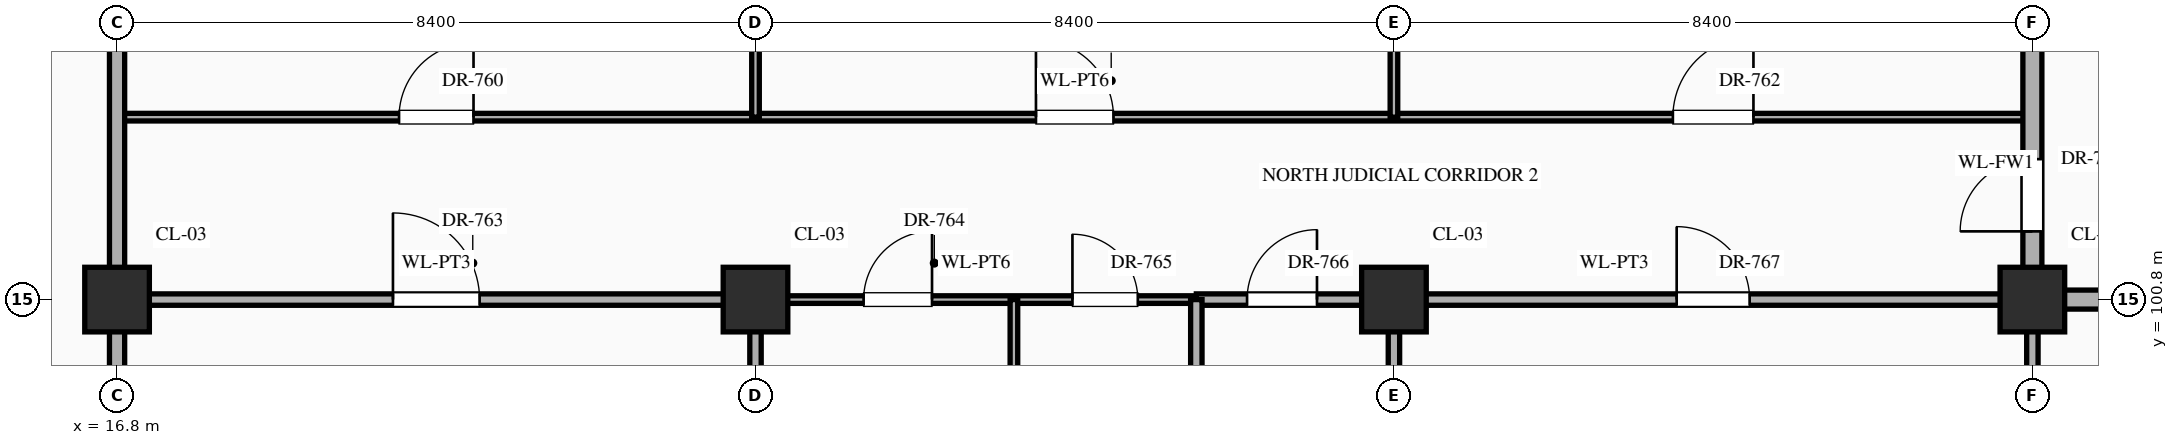
"""IFC4 building model, lengths in metres.
Left out: names, types, materials, properties, quantities, classifications, styles, units other than length and angle.
Written with IfcOpenShell. Run it as: python <this file> out.ifc"""

import sys

from ifc_helpers import new_model, si_unit, direction, frame, frame_2d, origin, origin_2d, place, context, subcontext, project, spatial, rectangle, extrude, element, fill, save


model = new_model("IFC4")
c1 = context("Model", 3, precision=1e-05, world=origin(), true_north=direction((0.0, 1.0)))
c2 = subcontext(c1, "Body", "Model", "MODEL_VIEW")
j1 = project(units=[si_unit("LENGTHUNIT", "METRE"), si_unit("PLANEANGLEUNIT", "RADIAN")], contexts=[c1])
p1 = place(None, origin())
s1 = spatial("IfcSite", under=j1, at=p1, CompositionType="ELEMENT")
p2 = place(p1, origin())
s2 = spatial("IfcBuilding", under=s1, at=p2, CompositionType="ELEMENT")
p3 = place(p2, origin())
s3 = spatial("IfcBuildingStorey", under=s2, at=p3, CompositionType="ELEMENT", Elevation=0.0)
for number, where, z_axis, x_axis in (
    (1, (16.8, 100.8, 0.0), (0.0, 0.0, 1.0), (1.0, 0.0, 0.0)),
    (2, (25.2, 100.8, 0.0), (0.0, 0.0, 1.0), (1.0, 0.0, 0.0)),
    (3, (33.6, 100.8, 0.0), (0.0, 0.0, 1.0), (1.0, 0.0, 0.0)),
    (4, (42.0, 100.8, 0.0), (0.0, 0.0, 1.0), (1.0, 0.0, 0.0)),
):
    element("IfcColumn", number, at=place(p3, frame(where, z_axis=z_axis, x_axis=x_axis)), inside=s3, PredefinedType="COLUMN", context=c2, shape_type="SweptSolid", body=[
        extrude(rectangle(XDim=0.85, YDim=0.85, at=origin_2d()), origin(), (0.0, 0.0, 1.0), 5.4),
    ])
p4 = place(p3, frame((16.8, 100.8, 0.0), z_axis=(0.0, 0.0, 1.0), x_axis=(1.0, 0.0, 0.0)))
e5 = element("IfcWall", 5, at=p4, inside=s3, PredefinedType="STANDARD", context=c2, shape_type="SweptSolid", body=[
    extrude(rectangle(XDim=8.4, YDim=0.15, at=frame_2d((4.2, 0.0))), origin(), (0.0, 0.0, 1.0), 4.27),
])
p5 = place(p4, frame((3.63, 0.0, 0.0)))
e6 = element("IfcOpeningElement", 6, at=p5, cuts=e5, PredefinedType="OPENING", context=c2, shape_type="SweptSolid", body=[
    extrude(rectangle(XDim=1.14, YDim=2.4, at=frame_2d((0.57, 1.2))), frame((0.0, 0.087, 0.0), z_axis=(0.0, -1.0, 0.0), x_axis=(1.0, 0.0, 0.0)), (0.0, 0.0, 1.0), 0.174),
])
p6 = place(p3, frame((25.2, 100.8, 0.0), z_axis=(0.0, 0.0, 1.0), x_axis=(1.0, 0.0, 0.0)))
e7 = element("IfcWall", 7, at=p6, inside=s3, PredefinedType="STANDARD", context=c2, shape_type="SweptSolid", body=[
    extrude(rectangle(XDim=5.8, YDim=0.1, at=frame_2d((2.9, 0.0))), origin(), (0.0, 0.0, 1.0), 4.27),
])
p7 = place(p6, frame((1.423, 0.0, 0.0)))
e8 = element("IfcOpeningElement", 8, at=p7, cuts=e7, PredefinedType="OPENING", context=c2, shape_type="SweptSolid", body=[
    extrude(rectangle(XDim=0.9, YDim=2.15, at=frame_2d((0.45, 1.075))), frame((0.0, 0.062, 0.0), z_axis=(0.0, -1.0, 0.0), x_axis=(1.0, 0.0, 0.0)), (0.0, 0.0, 1.0), 0.124),
])
p8 = place(p6, frame((4.17, 0.0, 0.0)))
e9 = element("IfcOpeningElement", 9, at=p8, cuts=e7, PredefinedType="OPENING", context=c2, shape_type="SweptSolid", body=[
    extrude(rectangle(XDim=0.86, YDim=2.1, at=frame_2d((0.43, 1.05))), frame((0.0, 0.062, 0.0), z_axis=(0.0, -1.0, 0.0), x_axis=(1.0, 0.0, 0.0)), (0.0, 0.0, 1.0), 0.124),
])
p9 = place(p3, frame((31.0, 100.8, 0.0), z_axis=(0.0, 0.0, 1.0), x_axis=(1.0, 0.0, 0.0)))
e10 = element("IfcWall", 10, at=p9, inside=s3, PredefinedType="STANDARD", context=c2, shape_type="SweptSolid", body=[
    extrude(rectangle(XDim=11.0, YDim=0.15, at=frame_2d((5.5, 0.0))), origin(), (0.0, 0.0, 1.0), 4.27),
])
p10 = place(p9, frame((0.667, 0.0, 0.0)))
e11 = element("IfcOpeningElement", 11, at=p10, cuts=e10, PredefinedType="OPENING", context=c2, shape_type="SweptSolid", body=[
    extrude(rectangle(XDim=0.92, YDim=2.15, at=frame_2d((0.46, 1.075))), frame((0.0, 0.087, 0.0), z_axis=(0.0, -1.0, 0.0), x_axis=(1.0, 0.0, 0.0)), (0.0, 0.0, 1.0), 0.174),
])
p11 = place(p9, frame((6.32, 0.0, 0.0)))
e12 = element("IfcOpeningElement", 12, at=p11, cuts=e10, PredefinedType="OPENING", context=c2, shape_type="SweptSolid", body=[
    extrude(rectangle(XDim=0.96, YDim=2.2, at=frame_2d((0.48, 1.1))), frame((0.0, 0.087, 0.0), z_axis=(0.0, -1.0, 0.0), x_axis=(1.0, 0.0, 0.0)), (0.0, 0.0, 1.0), 0.174),
])
p12 = place(p3, frame((42.0, 100.8, 0.0), z_axis=(0.0, 0.0, 1.0), x_axis=(1.0, 0.0, 0.0)))
e13 = element("IfcWall", 13, at=p12, inside=s3, PredefinedType="STANDARD", context=c2, shape_type="SweptSolid", body=[
    extrude(rectangle(XDim=4.2, YDim=0.25, at=frame_2d((2.1, 0.0))), origin(), (0.0, 0.0, 1.0), 4.27),
])
p13 = place(p3, frame((16.8, 103.2, 0.0), z_axis=(0.0, 0.0, 1.0), x_axis=(1.0, 0.0, 0.0)))
e14 = element("IfcWall", 14, at=p13, inside=s3, PredefinedType="STANDARD", context=c2, shape_type="SweptSolid", body=[
    extrude(rectangle(XDim=25.2, YDim=0.1, at=frame_2d((12.6, 0.0))), origin(), (0.0, 0.0, 1.0), 5.12),
])
p14 = place(p13, frame((3.71, 0.0, 0.0)))
e15 = element("IfcOpeningElement", 15, at=p14, cuts=e14, PredefinedType="OPENING", context=c2, shape_type="SweptSolid", body=[
    extrude(rectangle(XDim=0.98, YDim=2.35, at=frame_2d((0.49, 1.175))), frame((0.0, 0.062, 0.0), z_axis=(0.0, -1.0, 0.0), x_axis=(1.0, 0.0, 0.0)), (0.0, 0.0, 1.0), 0.124),
])
p15 = place(p13, frame((12.09, 0.0, 0.0)))
e16 = element("IfcOpeningElement", 16, at=p15, cuts=e14, PredefinedType="OPENING", context=c2, shape_type="SweptSolid", body=[
    extrude(rectangle(XDim=1.02, YDim=2.4, at=frame_2d((0.51, 1.2))), frame((0.0, 0.062, 0.0), z_axis=(0.0, -1.0, 0.0), x_axis=(1.0, 0.0, 0.0)), (0.0, 0.0, 1.0), 0.124),
])
p16 = place(p13, frame((20.47, 0.0, 0.0)))
e17 = element("IfcOpeningElement", 17, at=p16, cuts=e14, PredefinedType="OPENING", context=c2, shape_type="SweptSolid", body=[
    extrude(rectangle(XDim=1.06, YDim=2.4, at=frame_2d((0.53, 1.2))), frame((0.0, 0.062, 0.0), z_axis=(0.0, -1.0, 0.0), x_axis=(1.0, 0.0, 0.0)), (0.0, 0.0, 1.0), 0.124),
])
p17 = place(p3, frame((16.8, 91.2, 0.0), z_axis=(0.0, 0.0, 1.0), x_axis=(0.0, 1.0, 0.0)))
e18 = element("IfcWall", 18, at=p17, inside=s3, PredefinedType="STANDARD", context=c2, shape_type="SweptSolid", body=[
    extrude(rectangle(XDim=16.76, YDim=0.2, at=frame_2d((8.38, 0.0))), origin(), (0.0, 0.0, 1.0), 4.37),
])
p18 = place(p3, frame((25.2, 96.0, 0.0), z_axis=(0.0, 0.0, 1.0), x_axis=(0.0, 1.0, 0.0)))
e19 = element("IfcWall", 19, at=p18, inside=s3, PredefinedType="STANDARD", context=c2, shape_type="SweptSolid", body=[
    extrude(rectangle(XDim=4.8, YDim=0.15, at=frame_2d((2.4, 0.0))), origin(), (0.0, 0.0, 1.0), 4.37),
])
p19 = place(p3, frame((25.2, 103.2, 0.0), z_axis=(0.0, 0.0, 1.0), x_axis=(0.0, 1.0, 0.0)))
e20 = element("IfcWall", 20, at=p19, inside=s3, PredefinedType="STANDARD", context=c2, shape_type="SweptSolid", body=[
    extrude(rectangle(XDim=4.76, YDim=0.1, at=frame_2d((2.38, 0.0))), origin(), (0.0, 0.0, 1.0), 4.37),
])
p20 = place(p3, frame((28.6, 96.0, 0.0), z_axis=(0.0, 0.0, 1.0), x_axis=(0.0, 1.0, 0.0)))
e21 = element("IfcWall", 21, at=p20, inside=s3, PredefinedType="STANDARD", context=c2, shape_type="SweptSolid", body=[
    extrude(rectangle(XDim=4.8, YDim=0.1, at=frame_2d((2.4, 0.0))), origin(), (0.0, 0.0, 1.0), 5.12),
])
p21 = place(p20, frame((1.91, 0.0, 0.0)))
e22 = element("IfcOpeningElement", 22, at=p21, cuts=e21, PredefinedType="OPENING", context=c2, shape_type="SweptSolid", body=[
    extrude(rectangle(XDim=0.98, YDim=2.35, at=frame_2d((0.49, 1.175))), frame((0.0, 0.062, 0.0), z_axis=(0.0, -1.0, 0.0), x_axis=(1.0, 0.0, 0.0)), (0.0, 0.0, 1.0), 0.124),
])
p22 = place(p3, frame((31.0, 96.0, 0.0), z_axis=(0.0, 0.0, 1.0), x_axis=(0.0, 1.0, 0.0)))
e23 = element("IfcWall", 23, at=p22, inside=s3, PredefinedType="STANDARD", context=c2, shape_type="SweptSolid", body=[
    extrude(rectangle(XDim=4.8, YDim=0.15, at=frame_2d((2.4, 0.0))), origin(), (0.0, 0.0, 1.0), 5.12),
])
p23 = place(p22, frame((1.89, 0.0, 0.0)))
e24 = element("IfcOpeningElement", 24, at=p23, cuts=e23, PredefinedType="OPENING", context=c2, shape_type="SweptSolid", body=[
    extrude(rectangle(XDim=1.02, YDim=2.4, at=frame_2d((0.51, 1.2))), frame((0.0, 0.087, 0.0), z_axis=(0.0, -1.0, 0.0), x_axis=(1.0, 0.0, 0.0)), (0.0, 0.0, 1.0), 0.174),
])
p24 = place(p3, frame((33.6, 96.0, 0.0), z_axis=(0.0, 0.0, 1.0), x_axis=(0.0, 1.0, 0.0)))
e25 = element("IfcWall", 25, at=p24, inside=s3, PredefinedType="STANDARD", context=c2, shape_type="SweptSolid", body=[
    extrude(rectangle(XDim=4.8, YDim=0.15, at=frame_2d((2.4, 0.0))), origin(), (0.0, 0.0, 1.0), 4.37),
])
p25 = place(p3, frame((33.6, 103.2, 0.0), z_axis=(0.0, 0.0, 1.0), x_axis=(0.0, 1.0, 0.0)))
e26 = element("IfcWall", 26, at=p25, inside=s3, PredefinedType="STANDARD", context=c2, shape_type="SweptSolid", body=[
    extrude(rectangle(XDim=4.76, YDim=0.1, at=frame_2d((2.38, 0.0))), origin(), (0.0, 0.0, 1.0), 4.37),
])
p26 = place(p3, frame((42.0, 96.0, 0.0), z_axis=(0.0, 0.0, 1.0), x_axis=(0.0, 1.0, 0.0)))
e27 = element("IfcWall", 27, at=p26, inside=s3, PredefinedType="STANDARD", context=c2, shape_type="SweptSolid", body=[
    extrude(rectangle(XDim=4.8, YDim=0.15, at=frame_2d((2.4, 0.0))), origin(), (0.0, 0.0, 1.0), 4.37),
])
p27 = place(p3, frame((42.0, 100.8, 0.0), z_axis=(0.0, 0.0, 1.0), x_axis=(0.0, 1.0, 0.0)))
e28 = element("IfcWall", 28, at=p27, inside=s3, PredefinedType="STANDARD", context=c2, shape_type="SweptSolid", body=[
    extrude(rectangle(XDim=3.6, YDim=0.25, at=frame_2d((1.8, 0.0))), origin(), (0.0, 0.0, 1.0), 4.37),
])
p28 = place(p27, frame((0.897, 0.0, 0.0)))
e29 = element("IfcOpeningElement", 29, at=p28, cuts=e28, PredefinedType="OPENING", context=c2, shape_type="SweptSolid", body=[
    extrude(rectangle(XDim=0.95, YDim=2.15, at=frame_2d((0.475, 1.075))), frame((0.0, 0.137, 0.0), z_axis=(0.0, -1.0, 0.0), x_axis=(1.0, 0.0, 0.0)), (0.0, 0.0, 1.0), 0.274),
])
p29 = place(p28, origin())
e30 = element("IfcDoor", 30, at=p29, inside=s3, OperationType="SINGLE_SWING_LEFT", PredefinedType="DOOR", context=c2, shape_type="SweptSolid", body=[
    extrude(rectangle(XDim=0.95, YDim=2.15, at=frame_2d((0.475, 1.075))), frame((0.0, 0.025, 0.0), z_axis=(0.0, -1.0, 0.0), x_axis=(1.0, 0.0, 0.0)), (0.0, 0.0, 1.0), 0.05),
])
fill(e29, e30)
p30 = place(p14, origin())
e31 = element("IfcDoor", 31, at=p30, inside=s3, OperationType="SINGLE_SWING_RIGHT", PredefinedType="DOOR", context=c2, shape_type="SweptSolid", body=[
    extrude(rectangle(XDim=0.98, YDim=2.35, at=frame_2d((0.49, 1.175))), frame((0.0, 0.025, 0.0), z_axis=(0.0, -1.0, 0.0), x_axis=(1.0, 0.0, 0.0)), (0.0, 0.0, 1.0), 0.05),
])
fill(e15, e31)
p31 = place(p15, origin())
e32 = element("IfcDoor", 32, at=p31, inside=s3, OperationType="SINGLE_SWING_LEFT", PredefinedType="DOOR", context=c2, shape_type="SweptSolid", body=[
    extrude(rectangle(XDim=1.02, YDim=2.4, at=frame_2d((0.51, 1.2))), frame((0.0, 0.025, 0.0), z_axis=(0.0, -1.0, 0.0), x_axis=(1.0, 0.0, 0.0)), (0.0, 0.0, 1.0), 0.05),
])
fill(e16, e32)
p32 = place(p16, origin())
e33 = element("IfcDoor", 33, at=p32, inside=s3, OperationType="SINGLE_SWING_RIGHT", PredefinedType="DOOR", context=c2, shape_type="SweptSolid", body=[
    extrude(rectangle(XDim=1.06, YDim=2.4, at=frame_2d((0.53, 1.2))), frame((0.0, 0.025, 0.0), z_axis=(0.0, -1.0, 0.0), x_axis=(1.0, 0.0, 0.0)), (0.0, 0.0, 1.0), 0.05),
])
fill(e17, e33)
p33 = place(p5, origin())
e34 = element("IfcDoor", 34, at=p33, inside=s3, OperationType="SINGLE_SWING_LEFT", PredefinedType="DOOR", context=c2, shape_type="SweptSolid", body=[
    extrude(rectangle(XDim=1.14, YDim=2.4, at=frame_2d((0.57, 1.2))), frame((0.0, 0.025, 0.0), z_axis=(0.0, -1.0, 0.0), x_axis=(1.0, 0.0, 0.0)), (0.0, 0.0, 1.0), 0.05),
])
fill(e6, e34)
p34 = place(p7, origin())
e35 = element("IfcDoor", 35, at=p34, inside=s3, OperationType="SINGLE_SWING_RIGHT", PredefinedType="DOOR", context=c2, shape_type="SweptSolid", body=[
    extrude(rectangle(XDim=0.9, YDim=2.15, at=frame_2d((0.45, 1.075))), frame((0.0, 0.025, 0.0), z_axis=(0.0, -1.0, 0.0), x_axis=(1.0, 0.0, 0.0)), (0.0, 0.0, 1.0), 0.05),
])
fill(e8, e35)
p35 = place(p8, origin())
e36 = element("IfcDoor", 36, at=p35, inside=s3, OperationType="SINGLE_SWING_LEFT", PredefinedType="DOOR", context=c2, shape_type="SweptSolid", body=[
    extrude(rectangle(XDim=0.86, YDim=2.1, at=frame_2d((0.43, 1.05))), frame((0.0, 0.025, 0.0), z_axis=(0.0, -1.0, 0.0), x_axis=(1.0, 0.0, 0.0)), (0.0, 0.0, 1.0), 0.05),
])
fill(e9, e36)
p36 = place(p10, origin())
e37 = element("IfcDoor", 37, at=p36, inside=s3, OperationType="SINGLE_SWING_RIGHT", PredefinedType="DOOR", context=c2, shape_type="SweptSolid", body=[
    extrude(rectangle(XDim=0.92, YDim=2.15, at=frame_2d((0.46, 1.075))), frame((0.0, 0.025, 0.0), z_axis=(0.0, -1.0, 0.0), x_axis=(1.0, 0.0, 0.0)), (0.0, 0.0, 1.0), 0.05),
])
fill(e11, e37)
p37 = place(p11, origin())
e38 = element("IfcDoor", 38, at=p37, inside=s3, OperationType="SINGLE_SWING_LEFT", PredefinedType="DOOR", context=c2, shape_type="SweptSolid", body=[
    extrude(rectangle(XDim=0.96, YDim=2.2, at=frame_2d((0.48, 1.1))), frame((0.0, 0.025, 0.0), z_axis=(0.0, -1.0, 0.0), x_axis=(1.0, 0.0, 0.0)), (0.0, 0.0, 1.0), 0.05),
])
fill(e12, e38)
save(model, sys.argv[1])
